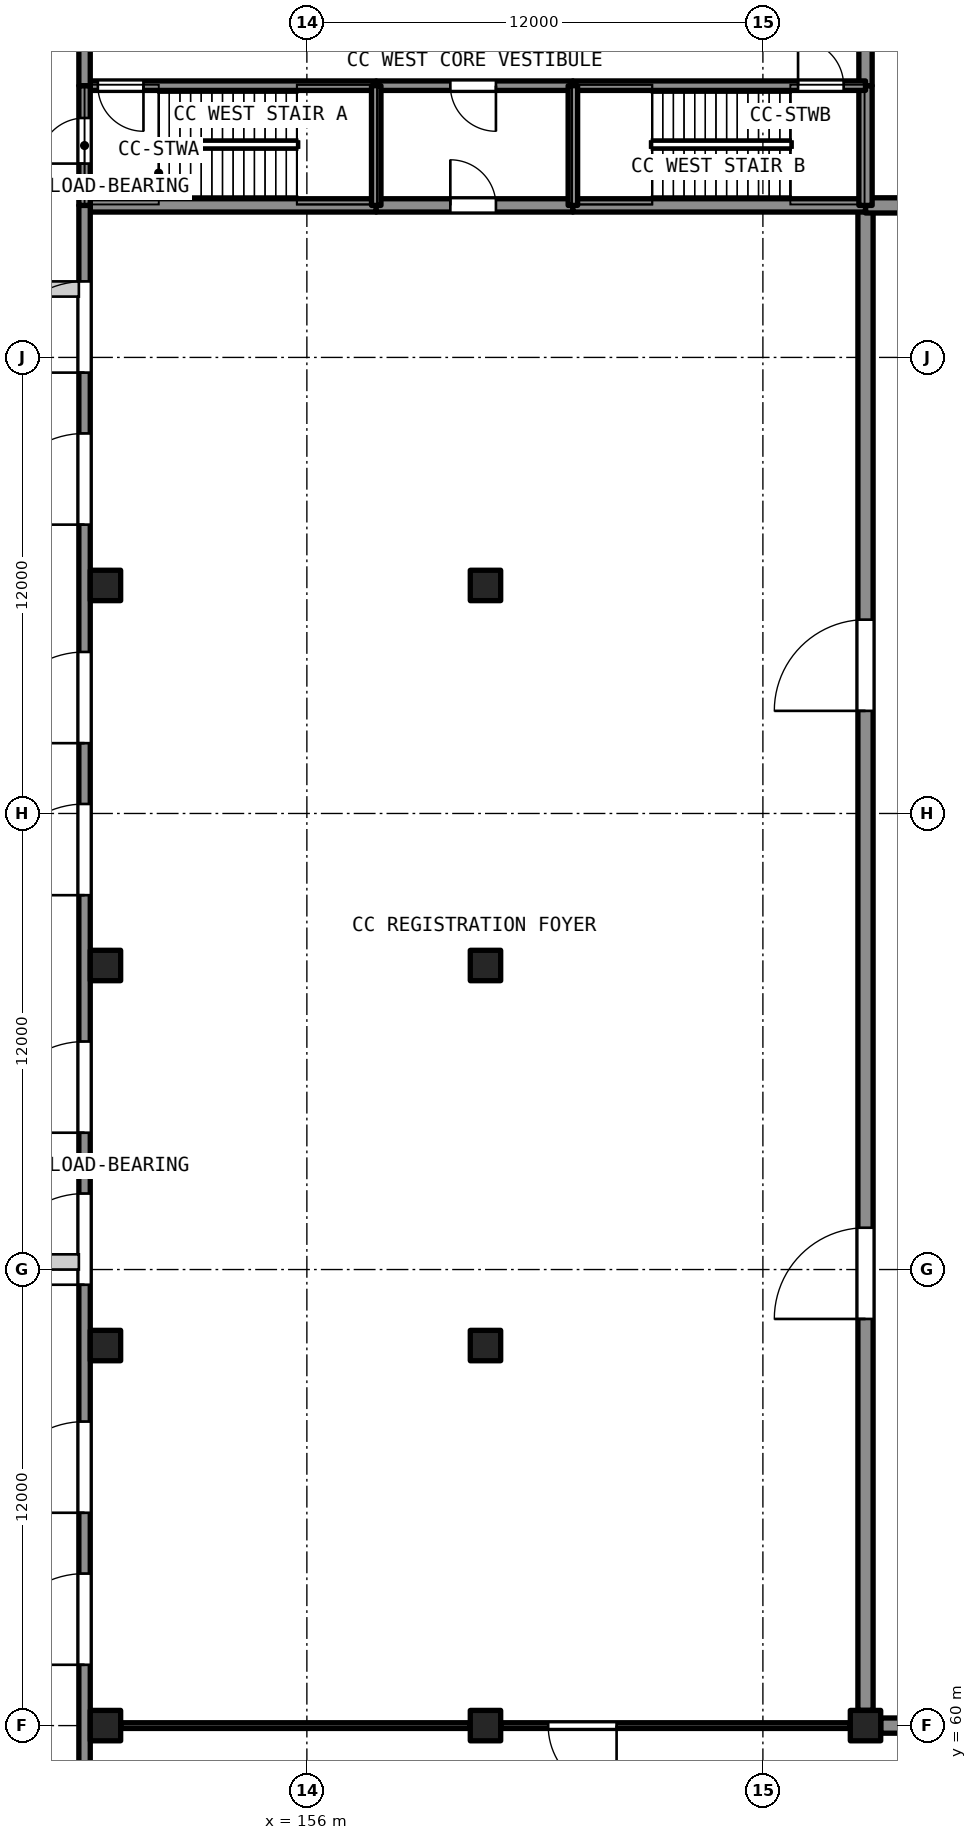
"""IFC4 building model, lengths in metres.
Left out: names, types, materials, properties, quantities, classifications, styles, units other than length and angle.
Written with IfcOpenShell. Run it as: python <this file> out.ifc"""

import sys

from ifc_helpers import new_model, si_unit, direction, frame, frame_2d, origin, origin_2d, place, context, subcontext, project, spatial, rectangle, extrude, element, fill, save


model = new_model("IFC4")
c1 = context("Model", 3, precision=1e-05, world=origin(), true_north=direction((0.0, 1.0)))
c2 = subcontext(c1, "Body", "Model", "MODEL_VIEW")
j1 = project(units=[si_unit("LENGTHUNIT", "METRE"), si_unit("PLANEANGLEUNIT", "RADIAN")], contexts=[c1])
p1 = place(None, origin())
s1 = spatial("IfcSite", under=j1, at=p1, CompositionType="ELEMENT")
p2 = place(p1, origin())
s2 = spatial("IfcBuilding", under=s1, at=p2, CompositionType="ELEMENT")
p3 = place(p2, origin())
s3 = spatial("IfcBuildingStorey", under=s2, at=p3, CompositionType="ELEMENT", Elevation=0.0)
for number, where, z_axis, x_axis in (
    (1, (150.7, 60.0, -1.2), (0.0, 0.0, 1.0), (1.0, 0.0, 0.0)),
    (2, (150.7, 70.0, -1.2), (0.0, 0.0, 1.0), (1.0, 0.0, 0.0)),
    (3, (150.7, 80.0, -1.2), (0.0, 0.0, 1.0), (1.0, 0.0, 0.0)),
    (4, (150.7, 90.0, -1.2), (0.0, 0.0, 1.0), (1.0, 0.0, 0.0)),
    (5, (160.7, 60.0, -1.2), (0.0, 0.0, 1.0), (1.0, 0.0, 0.0)),
    (6, (160.7, 70.0, -1.2), (0.0, 0.0, 1.0), (1.0, 0.0, 0.0)),
    (7, (160.7, 80.0, -1.2), (0.0, 0.0, 1.0), (1.0, 0.0, 0.0)),
    (8, (160.7, 90.0, -1.2), (0.0, 0.0, 1.0), (1.0, 0.0, 0.0)),
    (9, (170.7, 60.0, -1.2), (0.0, 0.0, 1.0), (1.0, 0.0, 0.0)),
):
    element("IfcColumn", number, at=place(p3, frame(where, z_axis=z_axis, x_axis=x_axis)), inside=s3, PredefinedType="COLUMN", context=c2, shape_type="SweptSolid", body=[
        extrude(rectangle(XDim=0.8, YDim=0.8, at=origin_2d()), origin(), (0.0, 0.0, 1.0), 10.2),
    ])
p4 = place(p3, frame((170.7, 60.4, 0.0), z_axis=(0.0, 0.0, 1.0), x_axis=(0.0, 1.0, 0.0)))
e10 = element("IfcWall", 10, at=p4, inside=s3, PredefinedType="SHEAR", context=c2, shape_type="SweptSolid", body=[
    extrude(rectangle(XDim=39.6, YDim=0.4, at=frame_2d((19.8, 0.0))), origin(), (0.0, 0.0, 1.0), 9.0),
])
p5 = place(p4, frame((10.3, 0.0, 0.0)))
e11 = element("IfcOpeningElement", 11, at=p5, cuts=e10, PredefinedType="OPENING", context=c2, shape_type="SweptSolid", body=[
    extrude(rectangle(XDim=2.4, YDim=2.4, at=frame_2d((1.2, 1.2))), frame((0.0, 0.21, 0.0), z_axis=(0.0, -1.0, 0.0), x_axis=(1.0, 0.0, 0.0)), (0.0, 0.0, 1.0), 0.421),
])
p6 = place(p4, frame((26.3, 0.0, 0.0)))
e12 = element("IfcOpeningElement", 12, at=p6, cuts=e10, PredefinedType="OPENING", context=c2, shape_type="SweptSolid", body=[
    extrude(rectangle(XDim=2.4, YDim=2.4, at=frame_2d((1.2, 1.2))), frame((0.0, 0.21, 0.0), z_axis=(0.0, -1.0, 0.0), x_axis=(1.0, 0.0, 0.0)), (0.0, 0.0, 1.0), 0.421),
])
p7 = place(p3, frame((171.1, 60.0, 0.0), z_axis=(0.0, 0.0, 1.0), x_axis=(1.0, 0.0, 0.0)))
e13 = element("IfcWall", 13, at=p7, inside=s3, PredefinedType="SHEAR", context=c2, shape_type="SweptSolid", body=[
    extrude(rectangle(XDim=9.2, YDim=0.4, at=frame_2d((4.6, 0.0))), origin(), (0.0, 0.0, 1.0), 9.0),
])
p8 = place(p3, frame((180.3, 100.0, 0.0), z_axis=(0.0, 0.0, 1.0), x_axis=(-1.0, 0.0, 0.0)))
e14 = element("IfcWall", 14, at=p8, inside=s3, PredefinedType="SHEAR", context=c2, shape_type="SweptSolid", body=[
    extrude(rectangle(XDim=9.6, YDim=0.4, at=frame_2d((4.8, 0.0))), origin(), (0.0, 0.0, 1.0), 9.0),
])
p9 = place(p8, frame((3.0, 0.0, 0.0)))
e15 = element("IfcOpeningElement", 15, at=p9, cuts=e14, PredefinedType="OPENING", context=c2, shape_type="SweptSolid", body=[
    extrude(rectangle(XDim=2.4, YDim=2.4, at=frame_2d((1.2, 1.2))), frame((0.0, 0.21, 0.0), z_axis=(0.0, -1.0, 0.0), x_axis=(1.0, 0.0, 0.0)), (0.0, 0.0, 1.0), 0.421),
])
p10 = place(p3, frame((150.3, 100.0, 0.0), z_axis=(0.0, 0.0, 1.0), x_axis=(1.0, 0.0, 0.0)))
e16 = element("IfcWall", 16, at=p10, inside=s3, PredefinedType="SHEAR", context=c2, shape_type="SweptSolid", body=[
    extrude(rectangle(XDim=7.525, YDim=0.35, at=frame_2d((3.762, 0.0))), origin(), (0.0, 0.0, 1.0), 8.59),
])
p11 = place(p3, frame((163.0, 100.0, 0.0), z_axis=(0.0, 0.0, 1.0), x_axis=(-1.0, 0.0, 0.0)))
e17 = element("IfcWall", 17, at=p11, inside=s3, PredefinedType="SHEAR", context=c2, shape_type="SweptSolid", body=[
    extrude(rectangle(XDim=5.175, YDim=0.35, at=frame_2d((2.587, 0.0))), origin(), (0.0, 0.0, 1.0), 8.59),
])
p12 = place(p11, frame((2.025, 0.0, 0.0)))
e18 = element("IfcOpeningElement", 18, at=p12, cuts=e17, PredefinedType="OPENING", context=c2, shape_type="SweptSolid", body=[
    extrude(rectangle(XDim=1.2, YDim=2.1, at=frame_2d((0.6, 1.05))), frame((0.0, 0.186, 0.0), z_axis=(0.0, -1.0, 0.0), x_axis=(1.0, 0.0, 0.0)), (0.0, 0.0, 1.0), 0.371),
])
p13 = place(p3, frame((163.0, 100.0, 0.0), z_axis=(0.0, 0.0, 1.0), x_axis=(1.0, 0.0, 0.0)))
e19 = element("IfcWall", 19, at=p13, inside=s3, PredefinedType="SHEAR", context=c2, shape_type="SweptSolid", body=[
    extrude(rectangle(XDim=7.7, YDim=0.35, at=frame_2d((3.85, 0.0))), origin(), (0.0, 0.0, 1.0), 8.59),
])
p14 = place(p3, frame((170.7, 100.0, 0.0), z_axis=(0.0, 0.0, 1.0), x_axis=(0.0, 1.0, 0.0)))
e20 = element("IfcWall", 20, at=p14, inside=s3, PredefinedType="SHEAR", context=c2, shape_type="SweptSolid", body=[
    extrude(rectangle(XDim=3.15, YDim=0.35, at=frame_2d((1.575, 0.0))), origin(), (0.0, 0.0, 1.0), 8.59),
])
p15 = place(p3, frame((170.7, 103.15, 0.0), z_axis=(0.0, 0.0, 1.0), x_axis=(0.0, 1.0, 0.0)))
e21 = element("IfcWall", 21, at=p15, inside=s3, PredefinedType="SHEAR", context=c2, shape_type="SweptSolid", body=[
    extrude(rectangle(XDim=7.25, YDim=0.35, at=frame_2d((3.625, 0.0))), origin(), (0.0, 0.0, 1.0), 8.59),
])
p16 = place(p3, frame((150.3, 103.15, 0.0), z_axis=(0.0, 0.0, 1.0), x_axis=(1.0, 0.0, 0.0)))
e22 = element("IfcWall", 22, at=p16, inside=s3, PredefinedType="SHEAR", context=c2, shape_type="SweptSolid", body=[
    extrude(rectangle(XDim=7.525, YDim=0.25, at=frame_2d((3.762, 0.0))), origin(), (0.0, 0.0, 1.0), 8.59),
])
p17 = place(p16, frame((0.2, 0.0, 0.0)))
e23 = element("IfcOpeningElement", 23, at=p17, cuts=e22, PredefinedType="OPENING", context=c2, shape_type="SweptSolid", body=[
    extrude(rectangle(XDim=1.2, YDim=2.1, at=frame_2d((0.6, 1.05))), frame((0.0, 0.135, 0.0), z_axis=(0.0, -1.0, 0.0), x_axis=(1.0, 0.0, 0.0)), (0.0, 0.0, 1.0), 0.271),
])
p18 = place(p3, frame((157.825, 103.15, 0.0), z_axis=(0.0, 0.0, 1.0), x_axis=(1.0, 0.0, 0.0)))
e24 = element("IfcWall", 24, at=p18, inside=s3, PredefinedType="SHEAR", context=c2, shape_type="SweptSolid", body=[
    extrude(rectangle(XDim=5.175, YDim=0.25, at=frame_2d((2.587, 0.0))), origin(), (0.0, 0.0, 1.0), 8.59),
])
p19 = place(p18, frame((1.95, 0.0, 0.0)))
e25 = element("IfcOpeningElement", 25, at=p19, cuts=e24, PredefinedType="OPENING", context=c2, shape_type="SweptSolid", body=[
    extrude(rectangle(XDim=1.2, YDim=2.1, at=frame_2d((0.6, 1.05))), frame((0.0, 0.135, 0.0), z_axis=(0.0, -1.0, 0.0), x_axis=(1.0, 0.0, 0.0)), (0.0, 0.0, 1.0), 0.271),
])
p20 = place(p3, frame((163.0, 103.15, 0.0), z_axis=(0.0, 0.0, 1.0), x_axis=(1.0, 0.0, 0.0)))
e26 = element("IfcWall", 26, at=p20, inside=s3, PredefinedType="SHEAR", context=c2, shape_type="SweptSolid", body=[
    extrude(rectangle(XDim=7.7, YDim=0.25, at=frame_2d((3.85, 0.0))), origin(), (0.0, 0.0, 1.0), 8.59),
])
p21 = place(p20, frame((5.925, 0.0, 0.0)))
e27 = element("IfcOpeningElement", 27, at=p21, cuts=e26, PredefinedType="OPENING", context=c2, shape_type="SweptSolid", body=[
    extrude(rectangle(XDim=1.2, YDim=2.1, at=frame_2d((0.6, 1.05))), frame((0.0, 0.135, 0.0), z_axis=(0.0, -1.0, 0.0), x_axis=(1.0, 0.0, 0.0)), (0.0, 0.0, 1.0), 0.271),
])
for number, where, z_axis, x_axis in (
    (28, (157.825, 100.0, 0.0), (0.0, 0.0, 1.0), (0.0, 1.0, 0.0)),
    (29, (163.0, 100.0, 0.0), (0.0, 0.0, 1.0), (0.0, 1.0, 0.0)),
):
    element("IfcWall", number, at=place(p3, frame(where, z_axis=z_axis, x_axis=x_axis)), inside=s3, PredefinedType="SHEAR", context=c2, shape_type="SweptSolid", body=[
        extrude(rectangle(XDim=3.15, YDim=0.25, at=frame_2d((1.575, 0.0))), origin(), (0.0, 0.0, 1.0), 8.59),
    ])
p22 = place(p3, frame((150.15, 49.45, 0.0), z_axis=(0.0, 0.0, 1.0), x_axis=(0.0, 1.0, 0.0)))
e30 = element("IfcWall", 30, at=p22, inside=s3, PredefinedType="SOLIDWALL", context=c2, shape_type="SweptSolid", body=[
    extrude(rectangle(XDim=50.55, YDim=0.3, at=frame_2d((25.275, 0.0))), origin(), (0.0, 0.0, 1.0), 8.59),
])
p23 = place(p22, frame((32.4, 0.0, 0.0)))
e31 = element("IfcOpeningElement", 31, at=p23, cuts=e30, PredefinedType="OPENING", context=c2, shape_type="SweptSolid", body=[
    extrude(rectangle(XDim=2.4, YDim=2.4, at=frame_2d((1.2, 1.2))), frame((0.0, 0.161, 0.0), z_axis=(0.0, -1.0, 0.0), x_axis=(1.0, 0.0, 0.0)), (0.0, 0.0, 1.0), 0.321),
])
p24 = place(p22, frame((36.4, 0.0, 0.0)))
e32 = element("IfcOpeningElement", 32, at=p24, cuts=e30, PredefinedType="OPENING", context=c2, shape_type="SweptSolid", body=[
    extrude(rectangle(XDim=2.4, YDim=2.4, at=frame_2d((1.2, 1.2))), frame((0.0, 0.161, 0.0), z_axis=(0.0, -1.0, 0.0), x_axis=(1.0, 0.0, 0.0)), (0.0, 0.0, 1.0), 0.321),
])
p25 = place(p22, frame((12.15, 0.0, 0.0)))
e33 = element("IfcOpeningElement", 33, at=p25, cuts=e30, PredefinedType="OPENING", context=c2, shape_type="SweptSolid", body=[
    extrude(rectangle(XDim=2.4, YDim=2.4, at=frame_2d((1.2, 1.2))), frame((0.0, 0.161, 0.0), z_axis=(0.0, -1.0, 0.0), x_axis=(1.0, 0.0, 0.0)), (0.0, 0.0, 1.0), 0.321),
])
p26 = place(p22, frame((16.15, 0.0, 0.0)))
e34 = element("IfcOpeningElement", 34, at=p26, cuts=e30, PredefinedType="OPENING", context=c2, shape_type="SweptSolid", body=[
    extrude(rectangle(XDim=2.4, YDim=2.4, at=frame_2d((1.2, 1.2))), frame((0.0, 0.161, 0.0), z_axis=(0.0, -1.0, 0.0), x_axis=(1.0, 0.0, 0.0)), (0.0, 0.0, 1.0), 0.321),
])
p27 = place(p22, frame((22.15, 0.0, 0.0)))
e35 = element("IfcOpeningElement", 35, at=p27, cuts=e30, PredefinedType="OPENING", context=c2, shape_type="SweptSolid", body=[
    extrude(rectangle(XDim=2.4, YDim=2.4, at=frame_2d((1.2, 1.2))), frame((0.0, 0.161, 0.0), z_axis=(0.0, -1.0, 0.0), x_axis=(1.0, 0.0, 0.0)), (0.0, 0.0, 1.0), 0.321),
])
p28 = place(p22, frame((26.15, 0.0, 0.0)))
e36 = element("IfcOpeningElement", 36, at=p28, cuts=e30, PredefinedType="OPENING", context=c2, shape_type="SweptSolid", body=[
    extrude(rectangle(XDim=2.4, YDim=2.4, at=frame_2d((1.2, 1.2))), frame((0.0, 0.161, 0.0), z_axis=(0.0, -1.0, 0.0), x_axis=(1.0, 0.0, 0.0)), (0.0, 0.0, 1.0), 0.321),
])
p29 = place(p22, frame((42.15, 0.0, 0.0)))
e37 = element("IfcOpeningElement", 37, at=p29, cuts=e30, PredefinedType="OPENING", context=c2, shape_type="SweptSolid", body=[
    extrude(rectangle(XDim=2.4, YDim=2.4, at=frame_2d((1.2, 1.2))), frame((0.0, 0.161, 0.0), z_axis=(0.0, -1.0, 0.0), x_axis=(1.0, 0.0, 0.0)), (0.0, 0.0, 1.0), 0.321),
])
p30 = place(p22, frame((46.15, 0.0, 0.0)))
e38 = element("IfcOpeningElement", 38, at=p30, cuts=e30, PredefinedType="OPENING", context=c2, shape_type="SweptSolid", body=[
    extrude(rectangle(XDim=2.4, YDim=2.4, at=frame_2d((1.2, 1.2))), frame((0.0, 0.161, 0.0), z_axis=(0.0, -1.0, 0.0), x_axis=(1.0, 0.0, 0.0)), (0.0, 0.0, 1.0), 0.321),
])
p31 = place(p3, frame((150.15, 100.0, 0.0), z_axis=(0.0, 0.0, 1.0), x_axis=(0.0, 1.0, 0.0)))
e39 = element("IfcWall", 39, at=p31, inside=s3, PredefinedType="SOLIDWALL", context=c2, shape_type="SweptSolid", body=[
    extrude(rectangle(XDim=3.15, YDim=0.3, at=frame_2d((1.575, 0.0))), origin(), (0.0, 0.0, 1.0), 8.59),
])
p32 = place(p31, frame((1.1, 0.0, 0.0)))
e40 = element("IfcOpeningElement", 40, at=p32, cuts=e39, PredefinedType="OPENING", context=c2, shape_type="SweptSolid", body=[
    extrude(rectangle(XDim=1.2, YDim=2.1, at=frame_2d((0.6, 1.05))), frame((0.0, 0.161, 0.0), z_axis=(0.0, -1.0, 0.0), x_axis=(1.0, 0.0, 0.0)), (0.0, 0.0, 1.0), 0.321),
])
p33 = place(p3, frame((150.15, 103.15, 0.0), z_axis=(0.0, 0.0, 1.0), x_axis=(0.0, 1.0, 0.0)))
e41 = element("IfcWall", 41, at=p33, inside=s3, PredefinedType="SOLIDWALL", context=c2, shape_type="SweptSolid", body=[
    extrude(rectangle(XDim=4.225, YDim=0.3, at=frame_2d((2.113, 0.0))), origin(), (0.0, 0.0, 1.0), 8.59),
])
p34 = place(p33, frame((1.2, 0.0, 0.0)))
e42 = element("IfcOpeningElement", 42, at=p34, cuts=e41, PredefinedType="OPENING", context=c2, shape_type="SweptSolid", body=[
    extrude(rectangle(XDim=1.8, YDim=2.1, at=frame_2d((0.9, 1.05))), frame((0.0, 0.161, 0.0), z_axis=(0.0, -1.0, 0.0), x_axis=(1.0, 0.0, 0.0)), (0.0, 0.0, 1.0), 0.321),
])
p35 = place(p3, frame((151.1, 60.0, 0.0), z_axis=(0.0, 0.0, 1.0), x_axis=(1.0, 0.0, 0.0)))
e43 = element("IfcWall", 43, at=p35, inside=s3, PredefinedType="PARTITIONING", context=c2, shape_type="SweptSolid", body=[
    extrude(rectangle(XDim=9.2, YDim=0.15, at=frame_2d((4.6, 0.0))), origin(), (0.0, 0.0, 1.0), 8.59),
])
p36 = place(p3, frame((170.3, 60.0, 0.0), z_axis=(0.0, 0.0, 1.0), x_axis=(-1.0, 0.0, 0.0)))
e44 = element("IfcWall", 44, at=p36, inside=s3, PredefinedType="PARTITIONING", context=c2, shape_type="SweptSolid", body=[
    extrude(rectangle(XDim=9.2, YDim=0.15, at=frame_2d((4.6, 0.0))), origin(), (0.0, 0.0, 1.0), 8.59),
])
p37 = place(p36, frame((6.15, 0.0, 0.0)))
e45 = element("IfcOpeningElement", 45, at=p37, cuts=e44, PredefinedType="OPENING", context=c2, shape_type="SweptSolid", body=[
    extrude(rectangle(XDim=1.8, YDim=2.1, at=frame_2d((0.9, 1.05))), frame((0.0, 0.085, 0.0), z_axis=(0.0, -1.0, 0.0), x_axis=(1.0, 0.0, 0.0)), (0.0, 0.0, 1.0), 0.171),
])
p38 = place(p37, origin())
e46 = element("IfcDoor", 46, at=p38, inside=s3, OperationType="DOUBLE_DOOR_SINGLE_SWING", PredefinedType="DOOR", context=c2, shape_type="SweptSolid", body=[
    extrude(rectangle(XDim=1.8, YDim=2.1, at=frame_2d((0.9, 1.05))), frame((0.0, 0.025, 0.0), z_axis=(0.0, -1.0, 0.0), x_axis=(1.0, 0.0, 0.0)), (0.0, 0.0, 1.0), 0.05),
])
fill(e45, e46)
p39 = place(p12, origin())
e47 = element("IfcDoor", 47, at=p39, inside=s3, OperationType="SINGLE_SWING_RIGHT", PredefinedType="DOOR", context=c2, shape_type="SweptSolid", body=[
    extrude(rectangle(XDim=1.2, YDim=2.1, at=frame_2d((0.6, 1.05))), frame((0.0, 0.025, 0.0), z_axis=(0.0, -1.0, 0.0), x_axis=(1.0, 0.0, 0.0)), (0.0, 0.0, 1.0), 0.05),
])
fill(e18, e47)
p40 = place(p5, origin())
e48 = element("IfcDoor", 48, at=p40, inside=s3, OperationType="DOUBLE_DOOR_SINGLE_SWING", PredefinedType="DOOR", context=c2, shape_type="SweptSolid", body=[
    extrude(rectangle(XDim=2.4, YDim=2.4, at=frame_2d((1.2, 1.2))), frame((0.0, 0.025, 0.0), z_axis=(0.0, -1.0, 0.0), x_axis=(1.0, 0.0, 0.0)), (0.0, 0.0, 1.0), 0.05),
])
fill(e11, e48)
p41 = place(p6, origin())
e49 = element("IfcDoor", 49, at=p41, inside=s3, OperationType="DOUBLE_DOOR_SINGLE_SWING", PredefinedType="DOOR", context=c2, shape_type="SweptSolid", body=[
    extrude(rectangle(XDim=2.4, YDim=2.4, at=frame_2d((1.2, 1.2))), frame((0.0, 0.025, 0.0), z_axis=(0.0, -1.0, 0.0), x_axis=(1.0, 0.0, 0.0)), (0.0, 0.0, 1.0), 0.05),
])
fill(e12, e49)
p42 = place(p23, origin())
e50 = element("IfcDoor", 50, at=p42, inside=s3, OperationType="DOUBLE_DOOR_SINGLE_SWING", PredefinedType="DOOR", context=c2, shape_type="SweptSolid", body=[
    extrude(rectangle(XDim=2.4, YDim=2.4, at=frame_2d((1.2, 1.2))), frame((0.0, 0.025, 0.0), z_axis=(0.0, -1.0, 0.0), x_axis=(1.0, 0.0, 0.0)), (0.0, 0.0, 1.0), 0.05),
])
fill(e31, e50)
p43 = place(p24, origin())
e51 = element("IfcDoor", 51, at=p43, inside=s3, OperationType="DOUBLE_DOOR_SINGLE_SWING", PredefinedType="DOOR", context=c2, shape_type="SweptSolid", body=[
    extrude(rectangle(XDim=2.4, YDim=2.4, at=frame_2d((1.2, 1.2))), frame((0.0, 0.025, 0.0), z_axis=(0.0, -1.0, 0.0), x_axis=(1.0, 0.0, 0.0)), (0.0, 0.0, 1.0), 0.05),
])
fill(e32, e51)
p44 = place(p25, origin())
e52 = element("IfcDoor", 52, at=p44, inside=s3, OperationType="DOUBLE_DOOR_SINGLE_SWING", PredefinedType="DOOR", context=c2, shape_type="SweptSolid", body=[
    extrude(rectangle(XDim=2.4, YDim=2.4, at=frame_2d((1.2, 1.2))), frame((0.0, 0.025, 0.0), z_axis=(0.0, -1.0, 0.0), x_axis=(1.0, 0.0, 0.0)), (0.0, 0.0, 1.0), 0.05),
])
fill(e33, e52)
p45 = place(p26, origin())
e53 = element("IfcDoor", 53, at=p45, inside=s3, OperationType="DOUBLE_DOOR_SINGLE_SWING", PredefinedType="DOOR", context=c2, shape_type="SweptSolid", body=[
    extrude(rectangle(XDim=2.4, YDim=2.4, at=frame_2d((1.2, 1.2))), frame((0.0, 0.025, 0.0), z_axis=(0.0, -1.0, 0.0), x_axis=(1.0, 0.0, 0.0)), (0.0, 0.0, 1.0), 0.05),
])
fill(e34, e53)
p46 = place(p27, origin())
e54 = element("IfcDoor", 54, at=p46, inside=s3, OperationType="DOUBLE_DOOR_SINGLE_SWING", PredefinedType="DOOR", context=c2, shape_type="SweptSolid", body=[
    extrude(rectangle(XDim=2.4, YDim=2.4, at=frame_2d((1.2, 1.2))), frame((0.0, 0.025, 0.0), z_axis=(0.0, -1.0, 0.0), x_axis=(1.0, 0.0, 0.0)), (0.0, 0.0, 1.0), 0.05),
])
fill(e35, e54)
p47 = place(p28, origin())
e55 = element("IfcDoor", 55, at=p47, inside=s3, OperationType="DOUBLE_DOOR_SINGLE_SWING", PredefinedType="DOOR", context=c2, shape_type="SweptSolid", body=[
    extrude(rectangle(XDim=2.4, YDim=2.4, at=frame_2d((1.2, 1.2))), frame((0.0, 0.025, 0.0), z_axis=(0.0, -1.0, 0.0), x_axis=(1.0, 0.0, 0.0)), (0.0, 0.0, 1.0), 0.05),
])
fill(e36, e55)
p48 = place(p29, origin())
e56 = element("IfcDoor", 56, at=p48, inside=s3, OperationType="DOUBLE_DOOR_SINGLE_SWING", PredefinedType="DOOR", context=c2, shape_type="SweptSolid", body=[
    extrude(rectangle(XDim=2.4, YDim=2.4, at=frame_2d((1.2, 1.2))), frame((0.0, 0.025, 0.0), z_axis=(0.0, -1.0, 0.0), x_axis=(1.0, 0.0, 0.0)), (0.0, 0.0, 1.0), 0.05),
])
fill(e37, e56)
p49 = place(p30, origin())
e57 = element("IfcDoor", 57, at=p49, inside=s3, OperationType="DOUBLE_DOOR_SINGLE_SWING", PredefinedType="DOOR", context=c2, shape_type="SweptSolid", body=[
    extrude(rectangle(XDim=2.4, YDim=2.4, at=frame_2d((1.2, 1.2))), frame((0.0, 0.025, 0.0), z_axis=(0.0, -1.0, 0.0), x_axis=(1.0, 0.0, 0.0)), (0.0, 0.0, 1.0), 0.05),
])
fill(e38, e57)
p50 = place(p17, origin())
e58 = element("IfcDoor", 58, at=p50, inside=s3, OperationType="SINGLE_SWING_RIGHT", PredefinedType="DOOR", context=c2, shape_type="SweptSolid", body=[
    extrude(rectangle(XDim=1.2, YDim=2.1, at=frame_2d((0.6, 1.05))), frame((0.0, 0.025, 0.0), z_axis=(0.0, -1.0, 0.0), x_axis=(1.0, 0.0, 0.0)), (0.0, 0.0, 1.0), 0.05),
])
fill(e23, e58)
p51 = place(p21, origin())
e59 = element("IfcDoor", 59, at=p51, inside=s3, OperationType="SINGLE_SWING_LEFT", PredefinedType="DOOR", context=c2, shape_type="SweptSolid", body=[
    extrude(rectangle(XDim=1.2, YDim=2.1, at=frame_2d((0.6, 1.05))), frame((0.0, 0.025, 0.0), z_axis=(0.0, -1.0, 0.0), x_axis=(1.0, 0.0, 0.0)), (0.0, 0.0, 1.0), 0.05),
])
fill(e27, e59)
p52 = place(p19, origin())
e60 = element("IfcDoor", 60, at=p52, inside=s3, OperationType="SINGLE_SWING_RIGHT", PredefinedType="DOOR", context=c2, shape_type="SweptSolid", body=[
    extrude(rectangle(XDim=1.2, YDim=2.1, at=frame_2d((0.6, 1.05))), frame((0.0, 0.025, 0.0), z_axis=(0.0, -1.0, 0.0), x_axis=(1.0, 0.0, 0.0)), (0.0, 0.0, 1.0), 0.05),
])
fill(e25, e60)
p53 = place(p32, origin())
e61 = element("IfcDoor", 61, at=p53, inside=s3, OperationType="SINGLE_SWING_LEFT", PredefinedType="DOOR", context=c2, shape_type="SweptSolid", body=[
    extrude(rectangle(XDim=1.2, YDim=2.1, at=frame_2d((0.6, 1.05))), frame((0.0, 0.025, 0.0), z_axis=(0.0, -1.0, 0.0), x_axis=(1.0, 0.0, 0.0)), (0.0, 0.0, 1.0), 0.05),
])
fill(e40, e61)
save(model, sys.argv[1])
